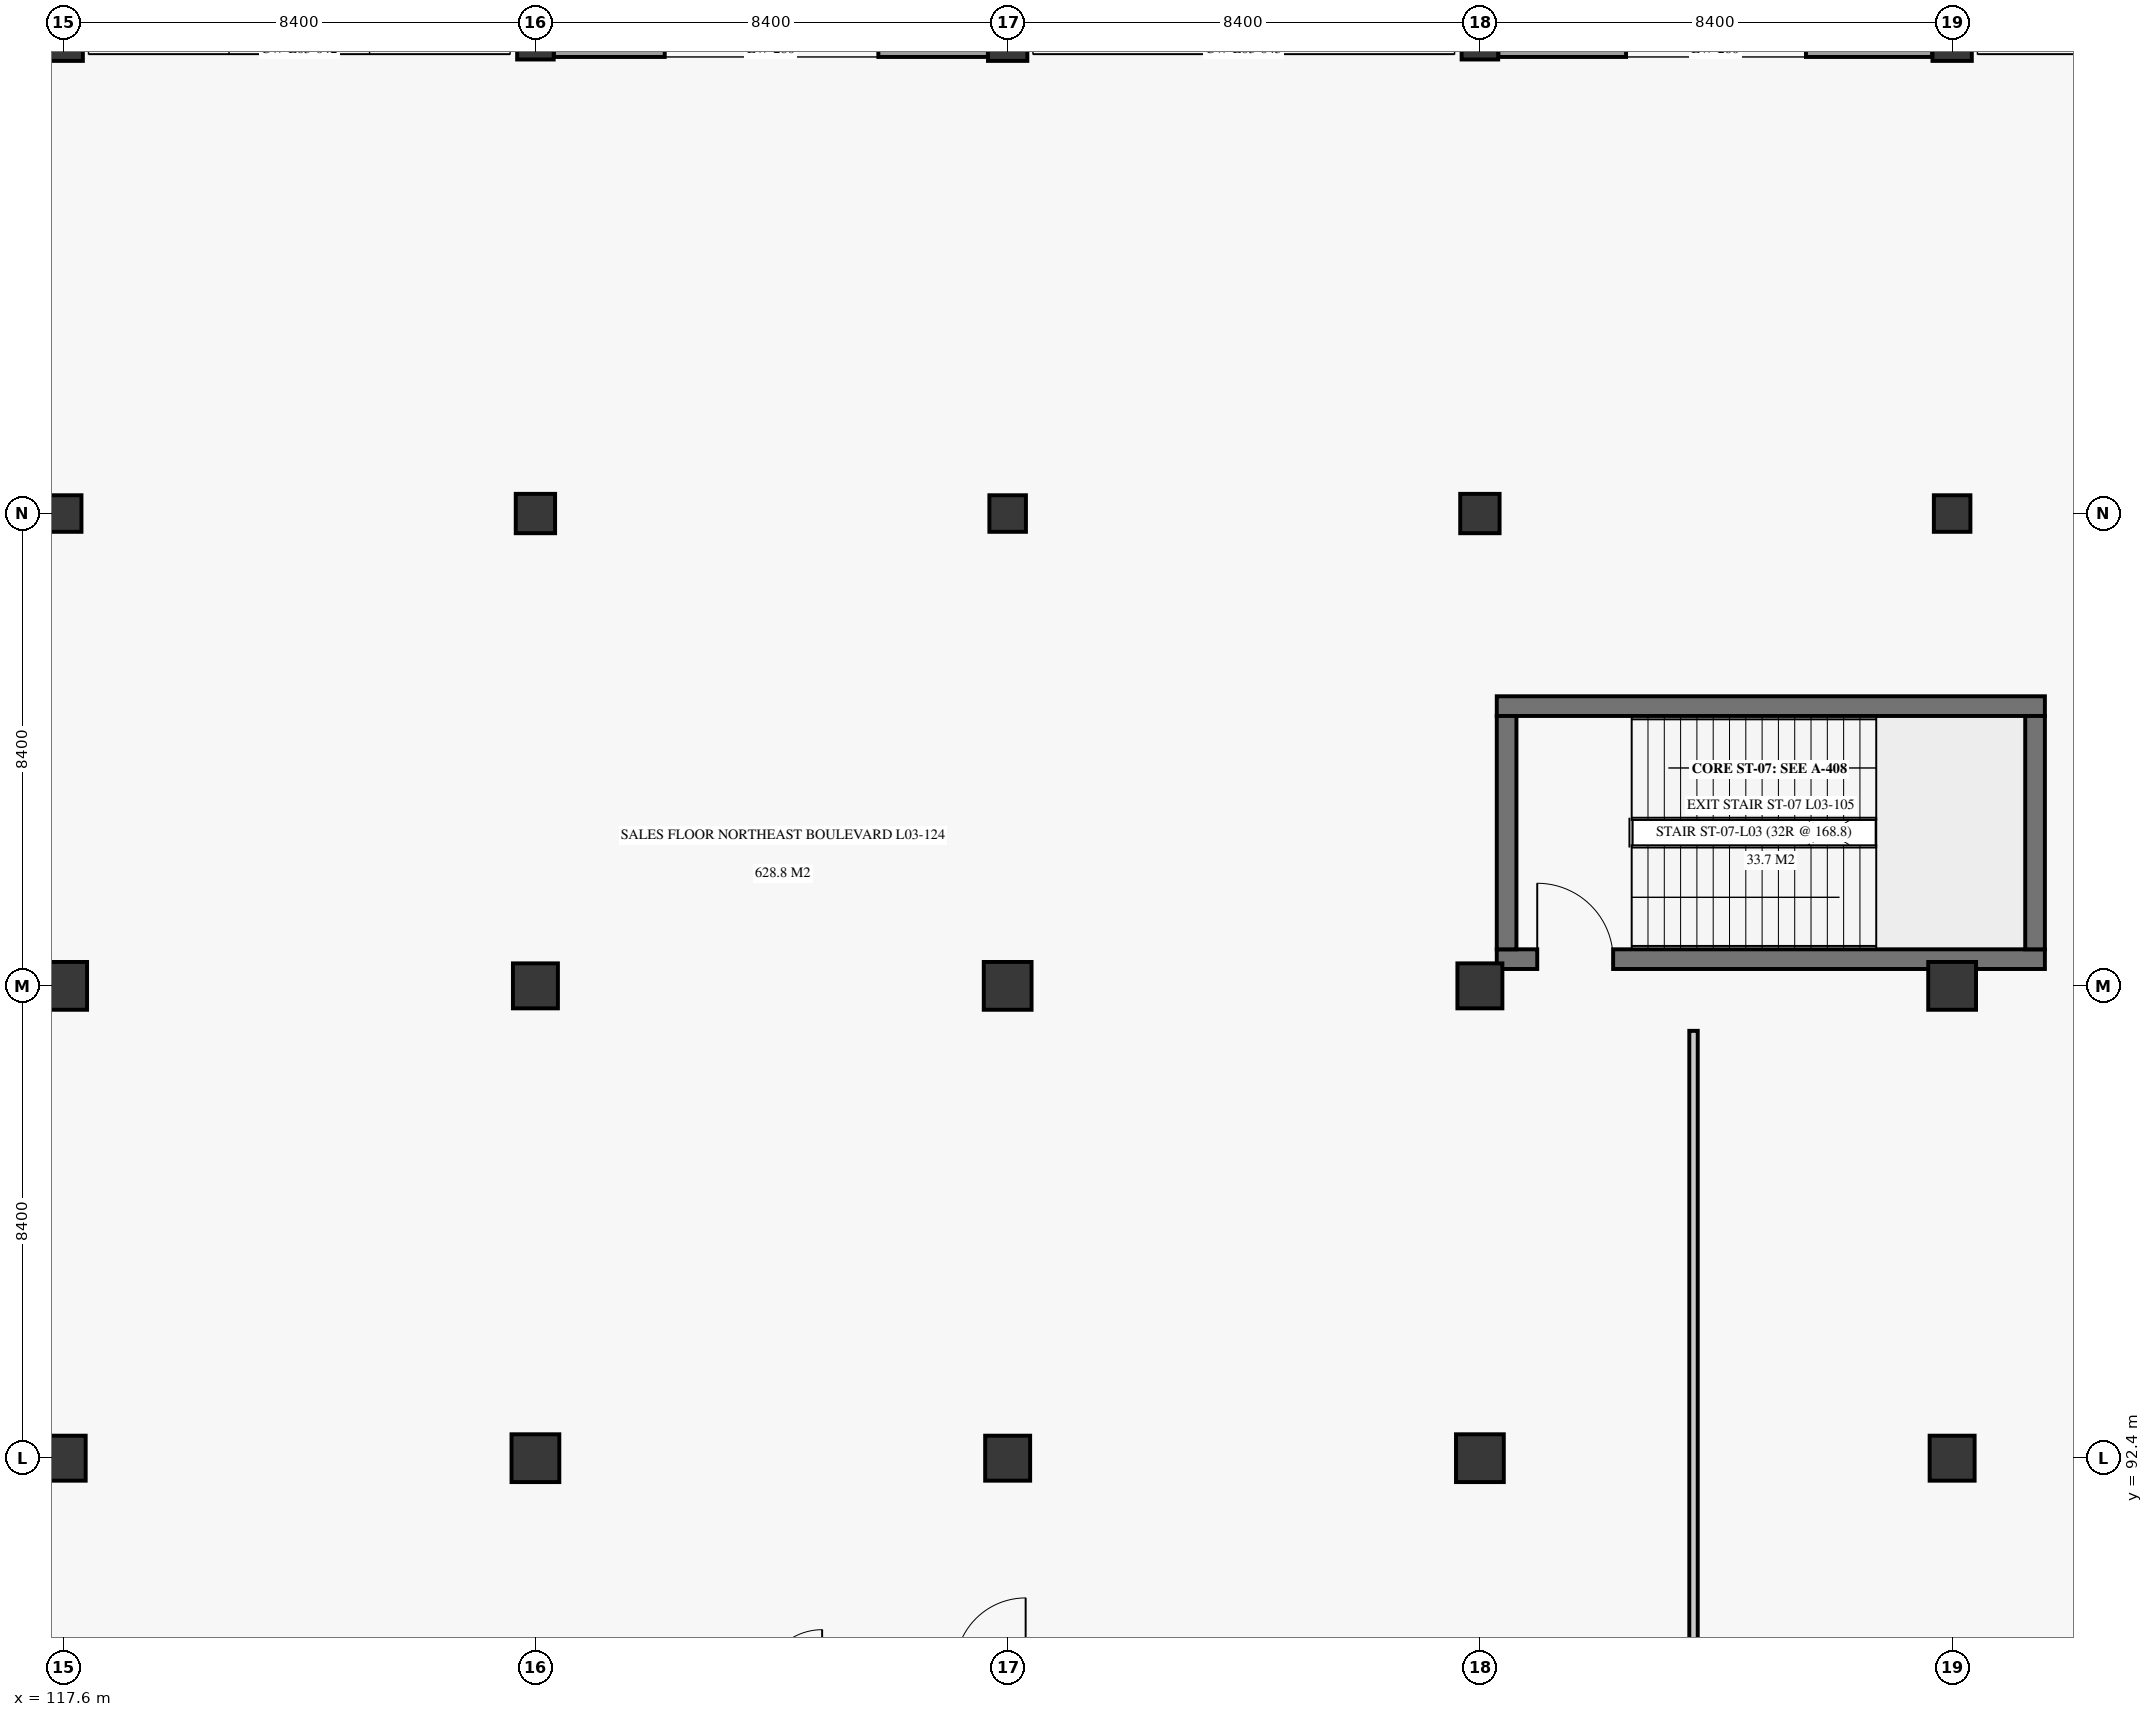
"""IFC4 building model, lengths in metres.
Left out: names, types, materials, properties, quantities, classifications, styles, units other than length and angle.
Written with IfcOpenShell. Run it as: python <this file> out.ifc"""

import sys

from ifc_helpers import new_model, si_unit, direction, frame, frame_2d, origin, origin_2d, place, context, subcontext, project, spatial, rectangle, extrude, element, fill, save


model = new_model("IFC4")
c1 = context("Model", 3, precision=1e-05, world=origin(), true_north=direction((0.0, 1.0)))
c2 = subcontext(c1, "Body", "Model", "MODEL_VIEW")
j1 = project(units=[si_unit("LENGTHUNIT", "METRE"), si_unit("PLANEANGLEUNIT", "RADIAN")], contexts=[c1])
p1 = place(None, origin())
s1 = spatial("IfcSite", under=j1, at=p1, CompositionType="ELEMENT")
p2 = place(p1, origin())
s2 = spatial("IfcBuilding", under=s1, at=p2, CompositionType="ELEMENT")
p3 = place(p2, frame((0.0, 0.0, 11.4)))
s3 = spatial("IfcBuildingStorey", under=s2, at=p3, CompositionType="ELEMENT", Elevation=11.4)
p4 = place(p3, frame((117.6, 92.4, 0.0), z_axis=(0.0, 0.0, 1.0), x_axis=(1.0, 0.0, 0.0)))
e1 = element("IfcColumn", 1, at=p4, inside=s3, PredefinedType="COLUMN", context=c2, shape_type="SweptSolid", body=[
    extrude(rectangle(XDim=0.8, YDim=0.8, at=origin_2d()), origin(), (0.0, 0.0, 1.0), 5.1),
])
p5 = place(p3, frame((117.6, 100.8, 0.0), z_axis=(0.0, 0.0, 1.0), x_axis=(1.0, 0.0, 0.0)))
e2 = element("IfcColumn", 2, at=p5, inside=s3, PredefinedType="COLUMN", context=c2, shape_type="SweptSolid", body=[
    extrude(rectangle(XDim=0.85, YDim=0.85, at=origin_2d()), origin(), (0.0, 0.0, 1.0), 5.1),
])
p6 = place(p3, frame((117.6, 109.2, 0.0), z_axis=(0.0, 0.0, 1.0), x_axis=(1.0, 0.0, 0.0)))
e3 = element("IfcColumn", 3, at=p6, inside=s3, PredefinedType="COLUMN", context=c2, shape_type="SweptSolid", body=[
    extrude(rectangle(XDim=0.65, YDim=0.65, at=origin_2d()), origin(), (0.0, 0.0, 1.0), 5.1),
])
p7 = place(p3, frame((117.6, 117.6, 0.0), z_axis=(0.0, 0.0, 1.0), x_axis=(1.0, 0.0, 0.0)))
e4 = element("IfcColumn", 4, at=p7, inside=s3, PredefinedType="COLUMN", context=c2, shape_type="SweptSolid", body=[
    extrude(rectangle(XDim=0.7, YDim=0.7, at=origin_2d()), origin(), (0.0, 0.0, 1.0), 5.1),
])
p8 = place(p3, frame((126.0, 92.4, 0.0), z_axis=(0.0, 0.0, 1.0), x_axis=(1.0, 0.0, 0.0)))
e5 = element("IfcColumn", 5, at=p8, inside=s3, PredefinedType="COLUMN", context=c2, shape_type="SweptSolid", body=[
    extrude(rectangle(XDim=0.85, YDim=0.85, at=origin_2d()), origin(), (0.0, 0.0, 1.0), 5.1),
])
p9 = place(p3, frame((126.0, 100.8, 0.0), z_axis=(0.0, 0.0, 1.0), x_axis=(1.0, 0.0, 0.0)))
e6 = element("IfcColumn", 6, at=p9, inside=s3, PredefinedType="COLUMN", context=c2, shape_type="SweptSolid", body=[
    extrude(rectangle(XDim=0.8, YDim=0.8, at=origin_2d()), origin(), (0.0, 0.0, 1.0), 5.1),
])
p10 = place(p3, frame((126.0, 109.2, 0.0), z_axis=(0.0, 0.0, 1.0), x_axis=(1.0, 0.0, 0.0)))
e7 = element("IfcColumn", 7, at=p10, inside=s3, PredefinedType="COLUMN", context=c2, shape_type="SweptSolid", body=[
    extrude(rectangle(XDim=0.7, YDim=0.7, at=origin_2d()), origin(), (0.0, 0.0, 1.0), 5.1),
])
p11 = place(p3, frame((126.0, 117.6, 0.0), z_axis=(0.0, 0.0, 1.0), x_axis=(1.0, 0.0, 0.0)))
e8 = element("IfcColumn", 8, at=p11, inside=s3, PredefinedType="COLUMN", context=c2, shape_type="SweptSolid", body=[
    extrude(rectangle(XDim=0.65, YDim=0.65, at=origin_2d()), origin(), (0.0, 0.0, 1.0), 5.1),
])
p12 = place(p3, frame((134.4, 92.4, 0.0), z_axis=(0.0, 0.0, 1.0), x_axis=(1.0, 0.0, 0.0)))
e9 = element("IfcColumn", 9, at=p12, inside=s3, PredefinedType="COLUMN", context=c2, shape_type="SweptSolid", body=[
    extrude(rectangle(XDim=0.8, YDim=0.8, at=origin_2d()), origin(), (0.0, 0.0, 1.0), 5.1),
])
p13 = place(p3, frame((134.4, 100.8, 0.0), z_axis=(0.0, 0.0, 1.0), x_axis=(1.0, 0.0, 0.0)))
e10 = element("IfcColumn", 10, at=p13, inside=s3, PredefinedType="COLUMN", context=c2, shape_type="SweptSolid", body=[
    extrude(rectangle(XDim=0.85, YDim=0.85, at=origin_2d()), origin(), (0.0, 0.0, 1.0), 5.1),
])
p14 = place(p3, frame((134.4, 109.2, 0.0), z_axis=(0.0, 0.0, 1.0), x_axis=(1.0, 0.0, 0.0)))
e11 = element("IfcColumn", 11, at=p14, inside=s3, PredefinedType="COLUMN", context=c2, shape_type="SweptSolid", body=[
    extrude(rectangle(XDim=0.65, YDim=0.65, at=origin_2d()), origin(), (0.0, 0.0, 1.0), 5.1),
])
p15 = place(p3, frame((134.4, 117.6, 0.0), z_axis=(0.0, 0.0, 1.0), x_axis=(1.0, 0.0, 0.0)))
e12 = element("IfcColumn", 12, at=p15, inside=s3, PredefinedType="COLUMN", context=c2, shape_type="SweptSolid", body=[
    extrude(rectangle(XDim=0.7, YDim=0.7, at=origin_2d()), origin(), (0.0, 0.0, 1.0), 5.1),
])
p16 = place(p3, frame((142.8, 92.4, 0.0), z_axis=(0.0, 0.0, 1.0), x_axis=(1.0, 0.0, 0.0)))
e13 = element("IfcColumn", 13, at=p16, inside=s3, PredefinedType="COLUMN", context=c2, shape_type="SweptSolid", body=[
    extrude(rectangle(XDim=0.85, YDim=0.85, at=origin_2d()), origin(), (0.0, 0.0, 1.0), 5.1),
])
p17 = place(p3, frame((142.8, 100.8, 0.0), z_axis=(0.0, 0.0, 1.0), x_axis=(1.0, 0.0, 0.0)))
e14 = element("IfcColumn", 14, at=p17, inside=s3, PredefinedType="COLUMN", context=c2, shape_type="SweptSolid", body=[
    extrude(rectangle(XDim=0.8, YDim=0.8, at=origin_2d()), origin(), (0.0, 0.0, 1.0), 5.1),
])
p18 = place(p3, frame((142.8, 109.2, 0.0), z_axis=(0.0, 0.0, 1.0), x_axis=(1.0, 0.0, 0.0)))
e15 = element("IfcColumn", 15, at=p18, inside=s3, PredefinedType="COLUMN", context=c2, shape_type="SweptSolid", body=[
    extrude(rectangle(XDim=0.7, YDim=0.7, at=origin_2d()), origin(), (0.0, 0.0, 1.0), 5.1),
])
p19 = place(p3, frame((142.8, 117.6, 0.0), z_axis=(0.0, 0.0, 1.0), x_axis=(1.0, 0.0, 0.0)))
e16 = element("IfcColumn", 16, at=p19, inside=s3, PredefinedType="COLUMN", context=c2, shape_type="SweptSolid", body=[
    extrude(rectangle(XDim=0.65, YDim=0.65, at=origin_2d()), origin(), (0.0, 0.0, 1.0), 5.1),
])
p20 = place(p3, frame((151.2, 92.4, 0.0), z_axis=(0.0, 0.0, 1.0), x_axis=(1.0, 0.0, 0.0)))
e17 = element("IfcColumn", 17, at=p20, inside=s3, PredefinedType="COLUMN", context=c2, shape_type="SweptSolid", body=[
    extrude(rectangle(XDim=0.8, YDim=0.8, at=origin_2d()), origin(), (0.0, 0.0, 1.0), 5.1),
])
p21 = place(p3, frame((151.2, 100.8, 0.0), z_axis=(0.0, 0.0, 1.0), x_axis=(1.0, 0.0, 0.0)))
e18 = element("IfcColumn", 18, at=p21, inside=s3, PredefinedType="COLUMN", context=c2, shape_type="SweptSolid", body=[
    extrude(rectangle(XDim=0.85, YDim=0.85, at=origin_2d()), origin(), (0.0, 0.0, 1.0), 5.1),
])
p22 = place(p3, frame((151.2, 109.2, 0.0), z_axis=(0.0, 0.0, 1.0), x_axis=(1.0, 0.0, 0.0)))
e19 = element("IfcColumn", 19, at=p22, inside=s3, PredefinedType="COLUMN", context=c2, shape_type="SweptSolid", body=[
    extrude(rectangle(XDim=0.65, YDim=0.65, at=origin_2d()), origin(), (0.0, 0.0, 1.0), 5.1),
])
p23 = place(p3, frame((151.2, 117.6, 0.0), z_axis=(0.0, 0.0, 1.0), x_axis=(1.0, 0.0, 0.0)))
e20 = element("IfcColumn", 20, at=p23, inside=s3, PredefinedType="COLUMN", context=c2, shape_type="SweptSolid", body=[
    extrude(rectangle(XDim=0.7, YDim=0.7, at=origin_2d()), origin(), (0.0, 0.0, 1.0), 5.1),
])
p24 = place(p3, frame((126.328, 117.45, 0.0), z_axis=(0.0, 0.0, 1.0), x_axis=(1.0, 0.0, 0.0)))
e21 = element("IfcWall", 21, at=p24, inside=s3, PredefinedType="SOLIDWALL", context=c2, shape_type="SweptSolid", body=[
    extrude(rectangle(XDim=7.72, YDim=0.26, at=frame_2d((3.86, 0.0))), origin(), (0.0, 0.0, 1.0), 4.38),
])
p25 = place(p24, frame((1.972, 0.0, 0.95)))
e22 = element("IfcOpeningElement", 22, at=p25, cuts=e21, PredefinedType="OPENING", context=c2, shape_type="SweptSolid", body=[
    extrude(rectangle(XDim=3.8, YDim=2.2, at=frame_2d((1.9, 1.1))), frame((0.0, 0.14, 0.0), z_axis=(0.0, -1.0, 0.0), x_axis=(1.0, 0.0, 0.0)), (0.0, 0.0, 1.0), 0.28),
])
p26 = place(p3, frame((143.128, 117.45, 0.0), z_axis=(0.0, 0.0, 1.0), x_axis=(1.0, 0.0, 0.0)))
e23 = element("IfcWall", 23, at=p26, inside=s3, PredefinedType="SOLIDWALL", context=c2, shape_type="SweptSolid", body=[
    extrude(rectangle(XDim=7.718, YDim=0.26, at=frame_2d((3.859, 0.0))), origin(), (0.0, 0.0, 1.0), 4.38),
])
p27 = place(p26, frame((2.272, 0.0, 0.95)))
e24 = element("IfcOpeningElement", 24, at=p27, cuts=e23, PredefinedType="OPENING", context=c2, shape_type="SweptSolid", body=[
    extrude(rectangle(XDim=3.2, YDim=2.15, at=frame_2d((1.6, 1.075))), frame((0.0, 0.14, 0.0), z_axis=(0.0, -1.0, 0.0), x_axis=(1.0, 0.0, 0.0)), (0.0, 0.0, 1.0), 0.28),
])
p28 = place(p3, frame((143.1, 101.275, 0.0), z_axis=(0.0, 0.0, 1.0), x_axis=(1.0, 0.0, 0.0)))
e25 = element("IfcWall", 25, at=p28, inside=s3, PredefinedType="SHEAR", context=c2, shape_type="SweptSolid", body=[
    extrude(rectangle(XDim=9.75, YDim=0.35, at=frame_2d((4.875, 0.0))), origin(), (0.0, 0.0, 1.0), 5.1),
])
p29 = place(p28, frame((0.72, 0.0, 0.0)))
e26 = element("IfcOpeningElement", 26, at=p29, cuts=e25, PredefinedType="OPENING", context=c2, shape_type="SweptSolid", body=[
    extrude(rectangle(XDim=1.35, YDim=2.25, at=frame_2d((0.675, 1.125))), frame((0.0, 0.185, 0.0), z_axis=(0.0, -1.0, 0.0), x_axis=(1.0, 0.0, 0.0)), (0.0, 0.0, 1.0), 0.37),
])
p30 = place(p3, frame((143.1, 105.775, 0.0), z_axis=(0.0, 0.0, 1.0), x_axis=(1.0, 0.0, 0.0)))
e27 = element("IfcWall", 27, at=p30, inside=s3, PredefinedType="SHEAR", context=c2, shape_type="SweptSolid", body=[
    extrude(rectangle(XDim=9.75, YDim=0.35, at=frame_2d((4.875, 0.0))), origin(), (0.0, 0.0, 1.0), 5.1),
])
for number, where, z_axis, x_axis in (
    (28, (143.275, 101.45, 0.0), (0.0, 0.0, 1.0), (0.0, 1.0, 0.0)),
    (29, (152.675, 101.45, 0.0), (0.0, 0.0, 1.0), (0.0, 1.0, 0.0)),
):
    element("IfcWall", number, at=place(p3, frame(where, z_axis=z_axis, x_axis=x_axis)), inside=s3, PredefinedType="SHEAR", context=c2, shape_type="SweptSolid", body=[
        extrude(rectangle(XDim=4.15, YDim=0.35, at=frame_2d((2.075, 0.0))), origin(), (0.0, 0.0, 1.0), 5.1),
    ])
p31 = place(p3, frame((146.6, 51.0, 0.0), z_axis=(0.0, 0.0, 1.0), x_axis=(0.0, 1.0, 0.0)))
e30 = element("IfcWall", 30, at=p31, inside=s3, PredefinedType="PARTITIONING", context=c2, shape_type="SweptSolid", body=[
    extrude(rectangle(XDim=49.0, YDim=0.15, at=frame_2d((24.5, 0.0))), origin(), (0.0, 0.0, 1.0), 4.72),
])
p32 = place(p31, frame((11.4, 0.0, 0.0)))
e31 = element("IfcOpeningElement", 31, at=p32, cuts=e30, PredefinedType="OPENING", context=c2, shape_type="SweptSolid", body=[
    extrude(rectangle(XDim=1.0, YDim=2.1, at=frame_2d((0.5, 1.05))), frame((0.0, 0.085, 0.0), z_axis=(0.0, -1.0, 0.0), x_axis=(1.0, 0.0, 0.0)), (0.0, 0.0, 1.0), 0.17),
])
p33 = place(p31, frame((36.6, 0.0, 0.0)))
e32 = element("IfcOpeningElement", 32, at=p33, cuts=e30, PredefinedType="OPENING", context=c2, shape_type="SweptSolid", body=[
    extrude(rectangle(XDim=1.0, YDim=2.1, at=frame_2d((0.5, 1.05))), frame((0.0, 0.085, 0.0), z_axis=(0.0, -1.0, 0.0), x_axis=(1.0, 0.0, 0.0)), (0.0, 0.0, 1.0), 0.17),
])
p34 = place(p29, origin())
e33 = element("IfcDoor", 33, at=p34, inside=s3, OperationType="SINGLE_SWING_LEFT", PredefinedType="DOOR", context=c2, shape_type="SweptSolid", body=[
    extrude(rectangle(XDim=1.35, YDim=2.25, at=frame_2d((0.675, 1.125))), frame((0.0, 0.025, 0.0), z_axis=(0.0, -1.0, 0.0), x_axis=(1.0, 0.0, 0.0)), (0.0, 0.0, 1.0), 0.05),
])
fill(e26, e33)
save(model, sys.argv[1])
